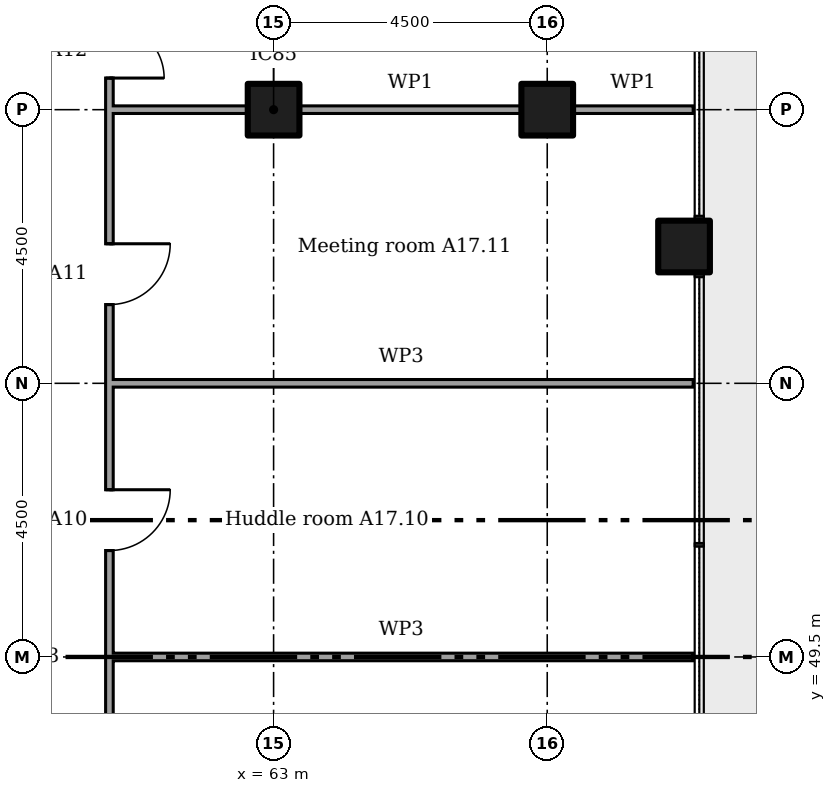
"""IFC4 building model, lengths in metres.
Left out: names, types, materials, properties, quantities, classifications, styles, units other than length and angle.
Written with IfcOpenShell. Run it as: python <this file> out.ifc"""

import sys

from ifc_helpers import new_model, si_unit, direction, frame, frame_2d, origin, origin_2d, place, context, subcontext, project, spatial, rectangle, extrude, element, fill, save


model = new_model("IFC4")
c1 = context("Model", 3, precision=1e-05, world=origin(), true_north=direction((0.0, 1.0)))
c2 = subcontext(c1, "Body", "Model", "MODEL_VIEW")
j1 = project(units=[si_unit("LENGTHUNIT", "METRE"), si_unit("PLANEANGLEUNIT", "RADIAN")], contexts=[c1])
p1 = place(None, origin())
s1 = spatial("IfcSite", under=j1, at=p1, CompositionType="ELEMENT")
p2 = place(p1, origin())
s2 = spatial("IfcBuilding", under=s1, at=p2, CompositionType="ELEMENT")
p3 = place(p2, frame((0.0, 0.0, 72.6)))
s3 = spatial("IfcBuildingStorey", under=s2, at=p3, CompositionType="ELEMENT", Elevation=72.6)
for number, where in (
    (1, (63.0, 58.5, 0.0)),
    (2, (67.5, 58.5, 0.0)),
    (3, (69.75, 56.25, 0.0)),
):
    element("IfcColumn", number, at=place(p3, frame(where)), inside=s3, PredefinedType="COLUMN", context=c2, shape_type="SweptSolid", body=[
        extrude(rectangle(XDim=0.85, YDim=0.85, at=origin_2d()), origin(), (0.0, 0.0, 1.0), 3.6),
    ])
for number, where in (
    (4, (60.3, 49.5, 0.0)),
    (5, (60.3, 54.0, 0.0)),
):
    element("IfcWall", number, at=place(p3, frame(where)), inside=s3, PredefinedType="MOVABLE", context=c2, shape_type="SweptSolid", body=[
        extrude(rectangle(XDim=9.6, YDim=0.125, at=frame_2d((4.8, 0.0))), origin(), (0.0, 0.0, 1.0), 2.766),
    ])
p4 = place(p3, frame((60.3, 58.5, 0.0)))
e6 = element("IfcWall", 6, at=p4, inside=s3, PredefinedType="PARTITIONING", context=c2, shape_type="SweptSolid", body=[
    extrude(rectangle(XDim=2.275, YDim=0.125, at=frame_2d((1.137, 0.0))), origin(), (0.0, 0.0, 1.0), 2.676),
])
p5 = place(p3, frame((63.425, 58.5, 0.0)))
e7 = element("IfcWall", 7, at=p5, inside=s3, PredefinedType="PARTITIONING", context=c2, shape_type="SweptSolid", body=[
    extrude(rectangle(XDim=3.65, YDim=0.125, at=frame_2d((1.825, 0.0))), origin(), (0.0, 0.0, 1.0), 2.676),
])
p6 = place(p3, frame((67.925, 58.5, 0.0)))
e8 = element("IfcWall", 8, at=p6, inside=s3, PredefinedType="PARTITIONING", context=c2, shape_type="SweptSolid", body=[
    extrude(rectangle(XDim=1.975, YDim=0.125, at=frame_2d((0.987, 0.0))), origin(), (0.0, 0.0, 1.0), 2.676),
])
p7 = place(p3, frame((60.3, 38.762, 0.0), z_axis=(0.0, 0.0, 1.0), x_axis=(0.0, 1.0, 0.0)))
e9 = element("IfcWall", 9, at=p7, inside=s3, PredefinedType="PARTITIONING", context=c2, shape_type="SweptSolid", body=[
    extrude(rectangle(XDim=21.475, YDim=0.125, at=frame_2d((10.738, 0.0))), origin(), (0.0, 0.0, 1.0), 3.45),
])
p8 = place(p7, frame((3.032, 0.0, 0.0)))
e10 = element("IfcOpeningElement", 10, at=p8, cuts=e9, PredefinedType="OPENING", context=c2, shape_type="SweptSolid", body=[
    extrude(rectangle(XDim=1.0, YDim=2.1, at=frame_2d((0.5, 1.05))), frame((0.0, 0.073, 0.0), z_axis=(0.0, -1.0, 0.0), x_axis=(1.0, 0.0, 0.0)), (0.0, 0.0, 1.0), 0.145),
])
p9 = place(p7, frame((8.442, 0.0, 0.0)))
e11 = element("IfcOpeningElement", 11, at=p9, cuts=e9, PredefinedType="OPENING", context=c2, shape_type="SweptSolid", body=[
    extrude(rectangle(XDim=1.0, YDim=2.1, at=frame_2d((0.5, 1.05))), frame((0.0, 0.073, 0.0), z_axis=(0.0, -1.0, 0.0), x_axis=(1.0, 0.0, 0.0)), (0.0, 0.0, 1.0), 0.145),
])
p10 = place(p7, frame((12.488, 0.0, 0.0)))
e12 = element("IfcOpeningElement", 12, at=p10, cuts=e9, PredefinedType="OPENING", context=c2, shape_type="SweptSolid", body=[
    extrude(rectangle(XDim=1.0, YDim=2.1, at=frame_2d((0.5, 1.05))), frame((0.0, 0.073, 0.0), z_axis=(0.0, -1.0, 0.0), x_axis=(1.0, 0.0, 0.0)), (0.0, 0.0, 1.0), 0.145),
])
p11 = place(p7, frame((16.532, 0.0, 0.0)))
e13 = element("IfcOpeningElement", 13, at=p11, cuts=e9, PredefinedType="OPENING", context=c2, shape_type="SweptSolid", body=[
    extrude(rectangle(XDim=1.0, YDim=2.1, at=frame_2d((0.5, 1.05))), frame((0.0, 0.073, 0.0), z_axis=(0.0, -1.0, 0.0), x_axis=(1.0, 0.0, 0.0)), (0.0, 0.0, 1.0), 0.145),
])
p12 = place(p7, frame((20.258, 0.0, 0.0)))
e14 = element("IfcOpeningElement", 14, at=p12, cuts=e9, PredefinedType="OPENING", context=c2, shape_type="SweptSolid", body=[
    extrude(rectangle(XDim=0.9, YDim=2.1, at=frame_2d((0.45, 1.05))), frame((0.0, 0.073, 0.0), z_axis=(0.0, -1.0, 0.0), x_axis=(1.0, 0.0, 0.0)), (0.0, 0.0, 1.0), 0.145),
])
p13 = place(p10, frame((1.0, 0.0, 0.0), x_axis=(-1.0, 0.0, 0.0)))
e15 = element("IfcDoor", 15, at=p13, inside=s3, OperationType="SINGLE_SWING_RIGHT", PredefinedType="DOOR", context=c2, shape_type="SweptSolid", body=[
    extrude(rectangle(XDim=1.0, YDim=2.1, at=frame_2d((0.5, 1.05))), frame((0.0, 0.025, 0.0), z_axis=(0.0, -1.0, 0.0), x_axis=(1.0, 0.0, 0.0)), (0.0, 0.0, 1.0), 0.05),
])
fill(e12, e15)
p14 = place(p11, frame((1.0, 0.0, 0.0), x_axis=(-1.0, 0.0, 0.0)))
e16 = element("IfcDoor", 16, at=p14, inside=s3, OperationType="SINGLE_SWING_RIGHT", PredefinedType="DOOR", context=c2, shape_type="SweptSolid", body=[
    extrude(rectangle(XDim=1.0, YDim=2.1, at=frame_2d((0.5, 1.05))), frame((0.0, 0.025, 0.0), z_axis=(0.0, -1.0, 0.0), x_axis=(1.0, 0.0, 0.0)), (0.0, 0.0, 1.0), 0.05),
])
fill(e13, e16)
p15 = place(p12, frame((0.9, 0.0, 0.0), x_axis=(-1.0, 0.0, 0.0)))
e17 = element("IfcDoor", 17, at=p15, inside=s3, OperationType="SINGLE_SWING_LEFT", PredefinedType="DOOR", context=c2, shape_type="SweptSolid", body=[
    extrude(rectangle(XDim=0.9, YDim=2.1, at=frame_2d((0.45, 1.05))), frame((0.0, 0.025, 0.0), z_axis=(0.0, -1.0, 0.0), x_axis=(1.0, 0.0, 0.0)), (0.0, 0.0, 1.0), 0.05),
])
fill(e14, e17)
save(model, sys.argv[1])
